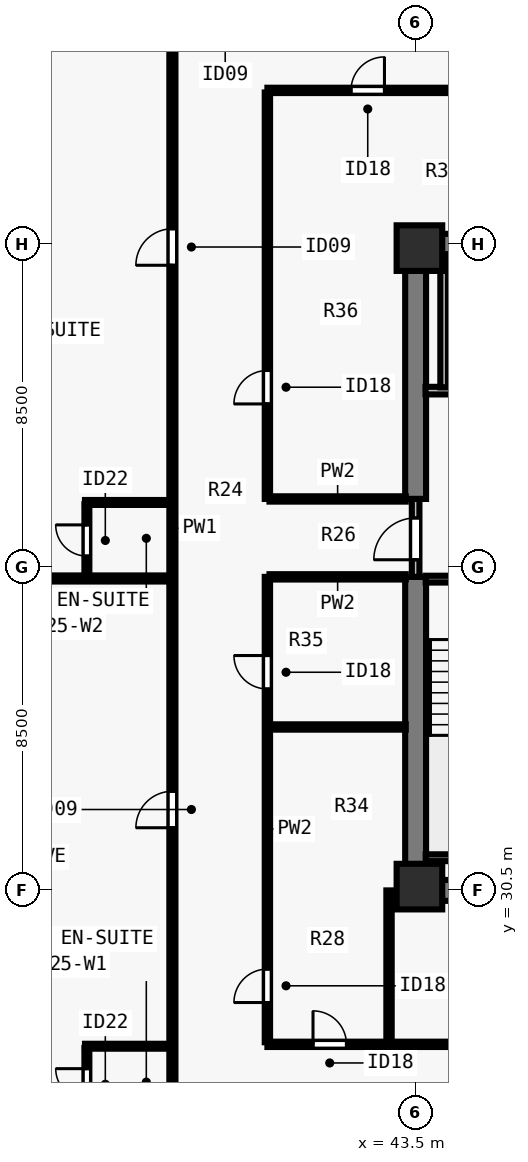
"""IFC4 building model, lengths in metres.
Left out: names, types, materials, properties, quantities, classifications, styles, units other than length and angle.
Written with IfcOpenShell. Run it as: python <this file> out.ifc"""

import sys

from ifc_helpers import new_model, si_unit, direction, frame, frame_2d, origin, origin_2d, place, context, subcontext, project, spatial, rectangle, extrude, element, fill, save


model = new_model("IFC4")
c1 = context("Model", 3, precision=1e-05, world=origin(), true_north=direction((0.0, 1.0)))
c2 = subcontext(c1, "Body", "Model", "MODEL_VIEW")
j1 = project(units=[si_unit("LENGTHUNIT", "METRE"), si_unit("PLANEANGLEUNIT", "RADIAN")], contexts=[c1])
p1 = place(None, origin())
s1 = spatial("IfcSite", under=j1, at=p1, CompositionType="ELEMENT")
p2 = place(p1, origin())
s2 = spatial("IfcBuilding", under=s1, at=p2, CompositionType="ELEMENT")
p3 = place(p2, frame((0.0, 0.0, 93.5)))
s3 = spatial("IfcBuildingStorey", under=s2, at=p3, CompositionType="ELEMENT", Elevation=93.5)
for number, where, z_axis, x_axis in (
    (1, (43.6, 30.6, 0.0), (0.0, 0.0, 1.0), (1.0, 0.0, 0.0)),
    (2, (43.6, 47.4, 0.0), (0.0, 0.0, 1.0), (1.0, 0.0, 0.0)),
):
    element("IfcColumn", number, at=place(p3, frame(where, z_axis=z_axis, x_axis=x_axis)), inside=s3, PredefinedType="COLUMN", context=c2, shape_type="SweptSolid", body=[
        extrude(rectangle(XDim=1.2, YDim=1.2, at=origin_2d()), origin(), (0.0, 0.0, 1.0), 3.5),
    ])
for number, where, z_axis, x_axis in (
    (3, (43.225, 30.5, 0.0), (0.0, 0.0, 1.0), (1.0, 0.0, 0.0)),
    (4, (43.225, 47.5, 0.0), (0.0, 0.0, 1.0), (1.0, 0.0, 0.0)),
):
    element("IfcWall", number, at=place(p3, frame(where, z_axis=z_axis, x_axis=x_axis)), inside=s3, PredefinedType="SHEAR", context=c2, shape_type="SweptSolid", body=[
        extrude(rectangle(XDim=17.55, YDim=0.55, at=frame_2d((8.775, 0.0))), origin(), (0.0, 0.0, 1.0), 3.24),
    ])
p4 = place(p3, frame((43.5, 30.765, 0.0), z_axis=(0.0, 0.0, 1.0), x_axis=(0.0, 1.0, 0.0)))
e5 = element("IfcWall", 5, at=p4, inside=s3, PredefinedType="SHEAR", context=c2, shape_type="SweptSolid", body=[
    extrude(rectangle(XDim=7.985, YDim=0.55, at=frame_2d((3.993, 0.0))), origin(), (0.0, 0.0, 1.0), 3.24),
])
p5 = place(p3, frame((43.5, 40.8, 0.0), z_axis=(0.0, 0.0, 1.0), x_axis=(0.0, 1.0, 0.0)))
e6 = element("IfcWall", 6, at=p5, inside=s3, PredefinedType="SHEAR", context=c2, shape_type="SweptSolid", body=[
    extrude(rectangle(XDim=6.435, YDim=0.55, at=frame_2d((3.218, 0.0))), origin(), (0.0, 0.0, 1.0), 3.24),
])
p6 = place(p3, frame((43.5, 38.75, 0.0), z_axis=(0.0, 0.0, 1.0), x_axis=(0.0, 1.0, 0.0)))
e7 = element("IfcWall", 7, at=p6, inside=s3, PredefinedType="SOLIDWALL", context=c2, shape_type="SweptSolid", body=[
    extrude(rectangle(XDim=2.05, YDim=0.2, at=frame_2d((1.025, 0.0))), origin(), (0.0, 0.0, 1.0), 3.24),
])
p7 = place(p6, frame((0.45, 0.0, 0.0)))
e8 = element("IfcOpeningElement", 8, at=p7, cuts=e7, PredefinedType="OPENING", context=c2, shape_type="SweptSolid", body=[
    extrude(rectangle(XDim=1.1, YDim=2.15, at=frame_2d((0.55, 1.075))), frame((0.0, 0.11, 0.0), z_axis=(0.0, -1.0, 0.0), x_axis=(1.0, 0.0, 0.0)), (0.0, 0.0, 1.0), 0.22),
])
p8 = place(p3, frame((43.76, 43.65, 0.0), z_axis=(0.0, 0.0, 1.0), x_axis=(1.0, 0.0, 0.0)))
e9 = element("IfcWall", 9, at=p8, inside=s3, PredefinedType="SOLIDWALL", context=c2, shape_type="SweptSolid", body=[
    extrude(rectangle(XDim=3.505, YDim=0.2, at=frame_2d((1.752, 0.0))), origin(), (0.0, 0.0, 1.0), 3.24),
])
p9 = place(p8, frame((1.11, 0.0, 0.0)))
e10 = element("IfcOpeningElement", 10, at=p9, cuts=e9, PredefinedType="OPENING", context=c2, shape_type="SweptSolid", body=[
    extrude(rectangle(XDim=1.1, YDim=2.2, at=frame_2d((0.55, 1.1))), frame((0.0, 0.11, 0.0), z_axis=(0.0, -1.0, 0.0), x_axis=(1.0, 0.0, 0.0)), (0.0, 0.0, 1.0), 0.22),
])
p10 = place(p3, frame((44.25, 43.735, 0.0), z_axis=(0.0, 0.0, 1.0), x_axis=(0.0, 1.0, 0.0)))
e11 = element("IfcWall", 11, at=p10, inside=s3, PredefinedType="SOLIDWALL", context=c2, shape_type="SweptSolid", body=[
    extrude(rectangle(XDim=3.505, YDim=0.2, at=frame_2d((1.752, 0.0))), origin(), (0.0, 0.0, 1.0), 3.24),
])
p11 = place(p3, frame((37.1, 24.015, 0.0), z_axis=(0.0, 0.0, 1.0), x_axis=(0.0, 1.0, 0.0)))
e12 = element("IfcWall", 12, at=p11, inside=s3, PredefinedType="PARTITIONING", context=c2, shape_type="SweptSolid", body=[
    extrude(rectangle(XDim=29.97, YDim=0.16, at=frame_2d((14.985, 0.0))), origin(), (0.0, 0.0, 1.0), 3.24),
])
p12 = place(p11, frame((8.134, 0.0, 0.0)))
e13 = element("IfcOpeningElement", 13, at=p12, cuts=e12, PredefinedType="OPENING", context=c2, shape_type="SweptSolid", body=[
    extrude(rectangle(XDim=0.96, YDim=2.15, at=frame_2d((0.48, 1.075))), frame((0.0, 0.09, 0.0), z_axis=(0.0, -1.0, 0.0), x_axis=(1.0, 0.0, 0.0)), (0.0, 0.0, 1.0), 0.18),
])
p13 = place(p11, frame((22.934, 0.0, 0.0)))
e14 = element("IfcOpeningElement", 14, at=p13, cuts=e12, PredefinedType="OPENING", context=c2, shape_type="SweptSolid", body=[
    extrude(rectangle(XDim=0.96, YDim=2.15, at=frame_2d((0.48, 1.075))), frame((0.0, 0.09, 0.0), z_axis=(0.0, -1.0, 0.0), x_axis=(1.0, 0.0, 0.0)), (0.0, 0.0, 1.0), 0.18),
])
p14 = place(p3, frame((39.6, 26.45, 0.0), z_axis=(0.0, 0.0, 1.0), x_axis=(1.0, 0.0, 0.0)))
e15 = element("IfcWall", 15, at=p14, inside=s3, PredefinedType="PARTITIONING", context=c2, shape_type="SweptSolid", body=[
    extrude(rectangle(XDim=24.8, YDim=0.14, at=frame_2d((12.4, 0.0))), origin(), (0.0, 0.0, 1.0), 3.24),
])
p15 = place(p14, frame((1.2, 0.0, 0.0)))
e16 = element("IfcOpeningElement", 16, at=p15, cuts=e15, PredefinedType="OPENING", context=c2, shape_type="SweptSolid", body=[
    extrude(rectangle(XDim=0.88, YDim=2.1, at=frame_2d((0.44, 1.05))), frame((0.0, 0.08, 0.0), z_axis=(0.0, -1.0, 0.0), x_axis=(1.0, 0.0, 0.0)), (0.0, 0.0, 1.0), 0.16),
])
p16 = place(p14, frame((8.9, 0.0, 0.0)))
e17 = element("IfcOpeningElement", 17, at=p16, cuts=e15, PredefinedType="OPENING", context=c2, shape_type="SweptSolid", body=[
    extrude(rectangle(XDim=0.88, YDim=2.1, at=frame_2d((0.44, 1.05))), frame((0.0, 0.08, 0.0), z_axis=(0.0, -1.0, 0.0), x_axis=(1.0, 0.0, 0.0)), (0.0, 0.0, 1.0), 0.16),
])
p17 = place(p14, frame((19.4, 0.0, 0.0)))
e18 = element("IfcOpeningElement", 18, at=p17, cuts=e15, PredefinedType="OPENING", context=c2, shape_type="SweptSolid", body=[
    extrude(rectangle(XDim=0.88, YDim=2.1, at=frame_2d((0.44, 1.05))), frame((0.0, 0.08, 0.0), z_axis=(0.0, -1.0, 0.0), x_axis=(1.0, 0.0, 0.0)), (0.0, 0.0, 1.0), 0.16),
])
p18 = place(p3, frame((39.6, 51.55, 0.0), z_axis=(0.0, 0.0, 1.0), x_axis=(1.0, 0.0, 0.0)))
e19 = element("IfcWall", 19, at=p18, inside=s3, PredefinedType="PARTITIONING", context=c2, shape_type="SweptSolid", body=[
    extrude(rectangle(XDim=24.8, YDim=0.14, at=frame_2d((12.4, 0.0))), origin(), (0.0, 0.0, 1.0), 3.24),
])
p19 = place(p18, frame((2.2, 0.0, 0.0)))
e20 = element("IfcOpeningElement", 20, at=p19, cuts=e19, PredefinedType="OPENING", context=c2, shape_type="SweptSolid", body=[
    extrude(rectangle(XDim=0.88, YDim=2.1, at=frame_2d((0.44, 1.05))), frame((0.0, 0.08, 0.0), z_axis=(0.0, -1.0, 0.0), x_axis=(1.0, 0.0, 0.0)), (0.0, 0.0, 1.0), 0.16),
])
p20 = place(p18, frame((12.9, 0.0, 0.0)))
e21 = element("IfcOpeningElement", 21, at=p20, cuts=e19, PredefinedType="OPENING", context=c2, shape_type="SweptSolid", body=[
    extrude(rectangle(XDim=0.88, YDim=2.1, at=frame_2d((0.44, 1.05))), frame((0.0, 0.08, 0.0), z_axis=(0.0, -1.0, 0.0), x_axis=(1.0, 0.0, 0.0)), (0.0, 0.0, 1.0), 0.16),
])
p21 = place(p18, frame((22.4, 0.0, 0.0)))
e22 = element("IfcOpeningElement", 22, at=p21, cuts=e19, PredefinedType="OPENING", context=c2, shape_type="SweptSolid", body=[
    extrude(rectangle(XDim=0.88, YDim=2.1, at=frame_2d((0.44, 1.05))), frame((0.0, 0.08, 0.0), z_axis=(0.0, -1.0, 0.0), x_axis=(1.0, 0.0, 0.0)), (0.0, 0.0, 1.0), 0.16),
])
p22 = place(p3, frame((39.6, 26.505, 0.0), z_axis=(0.0, 0.0, 1.0), x_axis=(0.0, 1.0, 0.0)))
e23 = element("IfcWall", 23, at=p22, inside=s3, PredefinedType="PARTITIONING", context=c2, shape_type="SweptSolid", body=[
    extrude(rectangle(XDim=12.245, YDim=0.14, at=frame_2d((6.123, 0.0))), origin(), (0.0, 0.0, 1.0), 3.24),
])
p23 = place(p22, frame((1.045, 0.0, 0.0)))
e24 = element("IfcOpeningElement", 24, at=p23, cuts=e23, PredefinedType="OPENING", context=c2, shape_type="SweptSolid", body=[
    extrude(rectangle(XDim=0.88, YDim=2.1, at=frame_2d((0.44, 1.05))), frame((0.0, 0.08, 0.0), z_axis=(0.0, -1.0, 0.0), x_axis=(1.0, 0.0, 0.0)), (0.0, 0.0, 1.0), 0.16),
])
p24 = place(p22, frame((9.295, 0.0, 0.0)))
e25 = element("IfcOpeningElement", 25, at=p24, cuts=e23, PredefinedType="OPENING", context=c2, shape_type="SweptSolid", body=[
    extrude(rectangle(XDim=0.88, YDim=2.1, at=frame_2d((0.44, 1.05))), frame((0.0, 0.08, 0.0), z_axis=(0.0, -1.0, 0.0), x_axis=(1.0, 0.0, 0.0)), (0.0, 0.0, 1.0), 0.16),
])
p25 = place(p3, frame((39.6, 40.8, 0.0), z_axis=(0.0, 0.0, 1.0), x_axis=(0.0, 1.0, 0.0)))
e26 = element("IfcWall", 26, at=p25, inside=s3, PredefinedType="PARTITIONING", context=c2, shape_type="SweptSolid", body=[
    extrude(rectangle(XDim=10.695, YDim=0.14, at=frame_2d((5.348, 0.0))), origin(), (0.0, 0.0, 1.0), 3.24),
])
p26 = place(p25, frame((2.5, 0.0, 0.0)))
e27 = element("IfcOpeningElement", 27, at=p26, cuts=e26, PredefinedType="OPENING", context=c2, shape_type="SweptSolid", body=[
    extrude(rectangle(XDim=0.88, YDim=2.1, at=frame_2d((0.44, 1.05))), frame((0.0, 0.08, 0.0), z_axis=(0.0, -1.0, 0.0), x_axis=(1.0, 0.0, 0.0)), (0.0, 0.0, 1.0), 0.16),
])
for number, where, z_axis, x_axis in (
    (28, (39.655, 38.75, 0.0), (0.0, 0.0, 1.0), (1.0, 0.0, 0.0)),
    (29, (39.655, 40.8, 0.0), (0.0, 0.0, 1.0), (1.0, 0.0, 0.0)),
):
    element("IfcWall", number, at=place(p3, frame(where, z_axis=z_axis, x_axis=x_axis)), inside=s3, PredefinedType="PARTITIONING", context=c2, shape_type="SweptSolid", body=[
        extrude(rectangle(XDim=3.585, YDim=0.14, at=frame_2d((1.792, 0.0))), origin(), (0.0, 0.0, 1.0), 3.24),
    ])
p27 = place(p3, frame((42.8, 26.505, 0.0), z_axis=(0.0, 0.0, 1.0), x_axis=(0.0, 1.0, 0.0)))
e30 = element("IfcWall", 30, at=p27, inside=s3, PredefinedType="PARTITIONING", context=c2, shape_type="SweptSolid", body=[
    extrude(rectangle(XDim=3.995, YDim=0.14, at=frame_2d((1.998, 0.0))), origin(), (0.0, 0.0, 1.0), 2.399),
])
p28 = place(p3, frame((39.655, 34.8, 0.0), z_axis=(0.0, 0.0, 1.0), x_axis=(1.0, 0.0, 0.0)))
e31 = element("IfcWall", 31, at=p28, inside=s3, PredefinedType="PARTITIONING", context=c2, shape_type="SweptSolid", body=[
    extrude(rectangle(XDim=3.585, YDim=0.14, at=frame_2d((1.792, 0.0))), origin(), (0.0, 0.0, 1.0), 3.24),
])
p29 = place(p3, frame((34.8, 26.4, 0.0), z_axis=(0.0, 0.0, 1.0), x_axis=(1.0, 0.0, 0.0)))
e32 = element("IfcWall", 32, at=p29, inside=s3, PredefinedType="PLUMBINGWALL", context=c2, shape_type="SweptSolid", body=[
    extrude(rectangle(XDim=2.235, YDim=0.13, at=frame_2d((1.117, 0.0))), origin(), (0.0, 0.0, 1.0), 3.24),
])
p30 = place(p3, frame((34.85, 24.45, 0.0), z_axis=(0.0, 0.0, 1.0), x_axis=(0.0, 1.0, 0.0)))
e33 = element("IfcWall", 33, at=p30, inside=s3, PredefinedType="PLUMBINGWALL", context=c2, shape_type="SweptSolid", body=[
    extrude(rectangle(XDim=1.9, YDim=0.13, at=frame_2d((0.95, 0.0))), origin(), (0.0, 0.0, 1.0), 3.24),
])
p31 = place(p30, frame((0.54, 0.0, 0.0)))
e34 = element("IfcOpeningElement", 34, at=p31, cuts=e33, PredefinedType="OPENING", context=c2, shape_type="SweptSolid", body=[
    extrude(rectangle(XDim=0.82, YDim=2.1, at=frame_2d((0.41, 1.05))), frame((0.0, 0.075, 0.0), z_axis=(0.0, -1.0, 0.0), x_axis=(1.0, 0.0, 0.0)), (0.0, 0.0, 1.0), 0.15),
])
p32 = place(p3, frame((26.845, 38.708, 0.0), z_axis=(0.0, 0.0, 1.0), x_axis=(1.0, 0.0, 0.0)))
e35 = element("IfcWall", 35, at=p32, inside=s3, PredefinedType="PARTITIONING", context=c2, shape_type="SweptSolid", body=[
    extrude(rectangle(XDim=10.19, YDim=0.16, at=frame_2d((5.095, 0.0))), origin(), (0.0, 0.0, 1.0), 2.809),
])
p33 = place(p3, frame((34.8, 40.708, 0.0), z_axis=(0.0, 0.0, 1.0), x_axis=(1.0, 0.0, 0.0)))
e36 = element("IfcWall", 36, at=p33, inside=s3, PredefinedType="PLUMBINGWALL", context=c2, shape_type="SweptSolid", body=[
    extrude(rectangle(XDim=2.235, YDim=0.13, at=frame_2d((1.117, 0.0))), origin(), (0.0, 0.0, 1.0), 2.809),
])
p34 = place(p3, frame((34.85, 38.772, 0.0), z_axis=(0.0, 0.0, 1.0), x_axis=(0.0, 1.0, 0.0)))
e37 = element("IfcWall", 37, at=p34, inside=s3, PredefinedType="PLUMBINGWALL", context=c2, shape_type="SweptSolid", body=[
    extrude(rectangle(XDim=1.885, YDim=0.13, at=frame_2d((0.942, 0.0))), origin(), (0.0, 0.0, 1.0), 3.24),
])
p35 = place(p34, frame((0.525, 0.0, 0.0)))
e38 = element("IfcOpeningElement", 38, at=p35, cuts=e37, PredefinedType="OPENING", context=c2, shape_type="SweptSolid", body=[
    extrude(rectangle(XDim=0.82, YDim=2.1, at=frame_2d((0.41, 1.05))), frame((0.0, 0.075, 0.0), z_axis=(0.0, -1.0, 0.0), x_axis=(1.0, 0.0, 0.0)), (0.0, 0.0, 1.0), 0.15),
])
p36 = place(p3, frame((43.765, 38.69, 0.0), z_axis=(0.0, 0.0, 1.0), x_axis=(1.0, 0.0, 0.0)))
e39 = element("IfcWall", 39, at=p36, inside=s3, PredefinedType="SOLIDWALL", context=c2, shape_type="SweptSolid", body=[
    extrude(rectangle(XDim=3.23, YDim=0.18, at=frame_2d((1.615, 0.0))), origin(), (0.0, 0.0, 1.0), 3.24),
])
p37 = place(p36, frame((1.14, 0.0, 0.0)))
e40 = element("IfcOpeningElement", 40, at=p37, cuts=e39, PredefinedType="OPENING", context=c2, shape_type="SweptSolid", body=[
    extrude(rectangle(XDim=0.95, YDim=2.15, at=frame_2d((0.475, 1.075))), frame((0.0, 0.1, 0.0), z_axis=(0.0, -1.0, 0.0), x_axis=(1.0, 0.0, 0.0)), (0.0, 0.0, 1.0), 0.2),
])
p38 = place(p3, frame((43.765, 31.36, 0.0), z_axis=(0.0, 0.0, 1.0), x_axis=(1.0, 0.0, 0.0)))
e41 = element("IfcWall", 41, at=p38, inside=s3, PredefinedType="SOLIDWALL", context=c2, shape_type="SweptSolid", body=[
    extrude(rectangle(XDim=3.23, YDim=0.18, at=frame_2d((1.615, 0.0))), origin(), (0.0, 0.0, 1.0), 3.24),
])
p39 = place(p7, origin())
e42 = element("IfcDoor", 42, at=p39, inside=s3, OperationType="SINGLE_SWING_LEFT", PredefinedType="DOOR", context=c2, shape_type="SweptSolid", body=[
    extrude(rectangle(XDim=1.1, YDim=2.15, at=frame_2d((0.55, 1.075))), frame((0.0, 0.025, 0.0), z_axis=(0.0, -1.0, 0.0), x_axis=(1.0, 0.0, 0.0)), (0.0, 0.0, 1.0), 0.05),
])
fill(e8, e42)
p40 = place(p15, origin())
e43 = element("IfcDoor", 43, at=p40, inside=s3, OperationType="SINGLE_SWING_LEFT", PredefinedType="DOOR", context=c2, shape_type="SweptSolid", body=[
    extrude(rectangle(XDim=0.88, YDim=2.1, at=frame_2d((0.44, 1.05))), frame((0.0, 0.025, 0.0), z_axis=(0.0, -1.0, 0.0), x_axis=(1.0, 0.0, 0.0)), (0.0, 0.0, 1.0), 0.05),
])
fill(e16, e43)
p41 = place(p19, origin())
e44 = element("IfcDoor", 44, at=p41, inside=s3, OperationType="SINGLE_SWING_RIGHT", PredefinedType="DOOR", context=c2, shape_type="SweptSolid", body=[
    extrude(rectangle(XDim=0.88, YDim=2.1, at=frame_2d((0.44, 1.05))), frame((0.0, 0.025, 0.0), z_axis=(0.0, -1.0, 0.0), x_axis=(1.0, 0.0, 0.0)), (0.0, 0.0, 1.0), 0.05),
])
fill(e20, e44)
p42 = place(p23, origin())
e45 = element("IfcDoor", 45, at=p42, inside=s3, OperationType="SINGLE_SWING_LEFT", PredefinedType="DOOR", context=c2, shape_type="SweptSolid", body=[
    extrude(rectangle(XDim=0.88, YDim=2.1, at=frame_2d((0.44, 1.05))), frame((0.0, 0.025, 0.0), z_axis=(0.0, -1.0, 0.0), x_axis=(1.0, 0.0, 0.0)), (0.0, 0.0, 1.0), 0.05),
])
fill(e24, e45)
p43 = place(p24, origin())
e46 = element("IfcDoor", 46, at=p43, inside=s3, OperationType="SINGLE_SWING_RIGHT", PredefinedType="DOOR", context=c2, shape_type="SweptSolid", body=[
    extrude(rectangle(XDim=0.88, YDim=2.1, at=frame_2d((0.44, 1.05))), frame((0.0, 0.025, 0.0), z_axis=(0.0, -1.0, 0.0), x_axis=(1.0, 0.0, 0.0)), (0.0, 0.0, 1.0), 0.05),
])
fill(e25, e46)
p44 = place(p26, origin())
e47 = element("IfcDoor", 47, at=p44, inside=s3, OperationType="SINGLE_SWING_LEFT", PredefinedType="DOOR", context=c2, shape_type="SweptSolid", body=[
    extrude(rectangle(XDim=0.88, YDim=2.1, at=frame_2d((0.44, 1.05))), frame((0.0, 0.025, 0.0), z_axis=(0.0, -1.0, 0.0), x_axis=(1.0, 0.0, 0.0)), (0.0, 0.0, 1.0), 0.05),
])
fill(e27, e47)
p45 = place(p31, origin())
e48 = element("IfcDoor", 48, at=p45, inside=s3, OperationType="SINGLE_SWING_RIGHT", PredefinedType="DOOR", context=c2, shape_type="SweptSolid", body=[
    extrude(rectangle(XDim=0.82, YDim=2.1, at=frame_2d((0.41, 1.05))), frame((0.0, 0.025, 0.0), z_axis=(0.0, -1.0, 0.0), x_axis=(1.0, 0.0, 0.0)), (0.0, 0.0, 1.0), 0.05),
])
fill(e34, e48)
p46 = place(p12, origin())
e49 = element("IfcDoor", 49, at=p46, inside=s3, OperationType="SINGLE_SWING_LEFT", PredefinedType="DOOR", context=c2, shape_type="SweptSolid", body=[
    extrude(rectangle(XDim=0.96, YDim=2.15, at=frame_2d((0.48, 1.075))), frame((0.0, 0.025, 0.0), z_axis=(0.0, -1.0, 0.0), x_axis=(1.0, 0.0, 0.0)), (0.0, 0.0, 1.0), 0.05),
])
fill(e13, e49)
p47 = place(p35, origin())
e50 = element("IfcDoor", 50, at=p47, inside=s3, OperationType="SINGLE_SWING_RIGHT", PredefinedType="DOOR", context=c2, shape_type="SweptSolid", body=[
    extrude(rectangle(XDim=0.82, YDim=2.1, at=frame_2d((0.41, 1.05))), frame((0.0, 0.025, 0.0), z_axis=(0.0, -1.0, 0.0), x_axis=(1.0, 0.0, 0.0)), (0.0, 0.0, 1.0), 0.05),
])
fill(e38, e50)
p48 = place(p13, origin())
e51 = element("IfcDoor", 51, at=p48, inside=s3, OperationType="SINGLE_SWING_LEFT", PredefinedType="DOOR", context=c2, shape_type="SweptSolid", body=[
    extrude(rectangle(XDim=0.96, YDim=2.15, at=frame_2d((0.48, 1.075))), frame((0.0, 0.025, 0.0), z_axis=(0.0, -1.0, 0.0), x_axis=(1.0, 0.0, 0.0)), (0.0, 0.0, 1.0), 0.05),
])
fill(e14, e51)
save(model, sys.argv[1])
